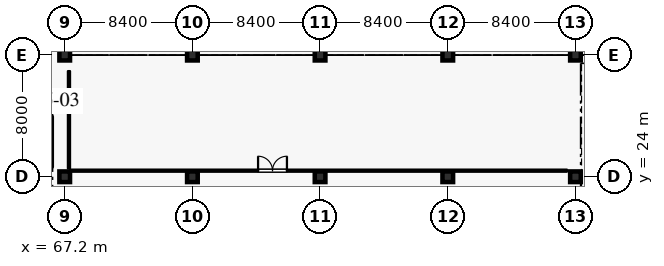
"""IFC4 building model, lengths in metres.
Left out: names, types, materials, properties, quantities, classifications, styles, units other than length and angle.
Written with IfcOpenShell. Run it as: python <this file> out.ifc"""

import sys

from ifc_helpers import new_model, si_unit, direction, frame, frame_2d, origin, origin_2d, place, context, subcontext, project, spatial, rectangle, extrude, element, fill, save


model = new_model("IFC4")
c1 = context("Model", 3, precision=1e-05, world=origin(), true_north=direction((0.0, 1.0)))
c2 = subcontext(c1, "Body", "Model", "MODEL_VIEW")
j1 = project(units=[si_unit("LENGTHUNIT", "METRE"), si_unit("PLANEANGLEUNIT", "RADIAN")], contexts=[c1])
p1 = place(None, origin())
s1 = spatial("IfcSite", under=j1, at=p1, CompositionType="ELEMENT")
p2 = place(p1, origin())
s2 = spatial("IfcBuilding", under=s1, at=p2, CompositionType="ELEMENT")
p3 = place(p2, frame((0.0, 0.0, 11.4)))
s3 = spatial("IfcBuildingStorey", under=s2, at=p3, CompositionType="ELEMENT", Elevation=11.4)
for number, where, z_axis, x_axis in (
    (1, (67.2, 24.0, 0.0), (0.0, 0.0, 1.0), (1.0, 0.0, 0.0)),
    (2, (67.2, 32.0, 0.0), (0.0, 0.0, 1.0), (1.0, 0.0, 0.0)),
    (3, (75.6, 24.0, 0.0), (0.0, 0.0, 1.0), (1.0, 0.0, 0.0)),
    (4, (75.6, 32.0, 0.0), (0.0, 0.0, 1.0), (1.0, 0.0, 0.0)),
    (5, (84.0, 24.0, 0.0), (0.0, 0.0, 1.0), (1.0, 0.0, 0.0)),
    (6, (84.0, 32.0, 0.0), (0.0, 0.0, 1.0), (1.0, 0.0, 0.0)),
    (7, (92.4, 24.0, 0.0), (0.0, 0.0, 1.0), (1.0, 0.0, 0.0)),
    (8, (92.4, 32.0, 0.0), (0.0, 0.0, 1.0), (1.0, 0.0, 0.0)),
    (9, (100.8, 24.0, 0.0), (0.0, 0.0, 1.0), (1.0, 0.0, 0.0)),
    (10, (100.8, 32.0, 0.0), (0.0, 0.0, 1.0), (1.0, 0.0, 0.0)),
):
    element("IfcColumn", number, at=place(p3, frame(where, z_axis=z_axis, x_axis=x_axis)), inside=s3, PredefinedType="COLUMN", context=c2, shape_type="SweptSolid", body=[
        extrude(rectangle(XDim=0.7, YDim=0.7, at=origin_2d()), origin(), (0.0, 0.0, 1.0), 4.8),
    ])
p4 = place(p3, frame((67.56, 24.4, 0.0), z_axis=(0.0, 0.0, 1.0), x_axis=(1.0, 0.0, 0.0)))
e11 = element("IfcWall", 11, at=p4, inside=s3, PredefinedType="PARTITIONING", context=c2, shape_type="SweptSolid", body=[
    extrude(rectangle(XDim=32.68, YDim=0.14, at=frame_2d((16.34, 0.0))), origin(), (0.0, 0.0, 1.0), 4.535),
])
p5 = place(p4, frame((12.36, 0.0, 0.0)))
e12 = element("IfcOpeningElement", 12, at=p5, cuts=e11, PredefinedType="OPENING", context=c2, shape_type="SweptSolid", body=[
    extrude(rectangle(XDim=1.9, YDim=2.4, at=frame_2d((0.95, 1.2))), frame((0.0, 0.08, 0.0), z_axis=(0.0, -1.0, 0.0), x_axis=(1.0, 0.0, 0.0)), (0.0, 0.0, 1.0), 0.16),
])
p6 = place(p3, frame((67.48, 24.54, 0.0), z_axis=(0.0, 0.0, 1.0), x_axis=(0.0, 1.0, 0.0)))
e13 = element("IfcWall", 13, at=p6, inside=s3, PredefinedType="PARTITIONING", context=c2, shape_type="SweptSolid", body=[
    extrude(rectangle(XDim=6.41, YDim=0.14, at=frame_2d((3.205, 0.0))), origin(), (0.0, 0.0, 1.0), 4.535),
])
p7 = place(p5, origin())
e14 = element("IfcDoor", 14, at=p7, inside=s3, OperationType="DOUBLE_DOOR_SINGLE_SWING", PredefinedType="DOOR", context=c2, shape_type="SweptSolid", body=[
    extrude(rectangle(XDim=1.9, YDim=2.4, at=frame_2d((0.95, 1.2))), frame((0.0, 0.025, 0.0), z_axis=(0.0, -1.0, 0.0), x_axis=(1.0, 0.0, 0.0)), (0.0, 0.0, 1.0), 0.05),
])
fill(e12, e14)
save(model, sys.argv[1])
